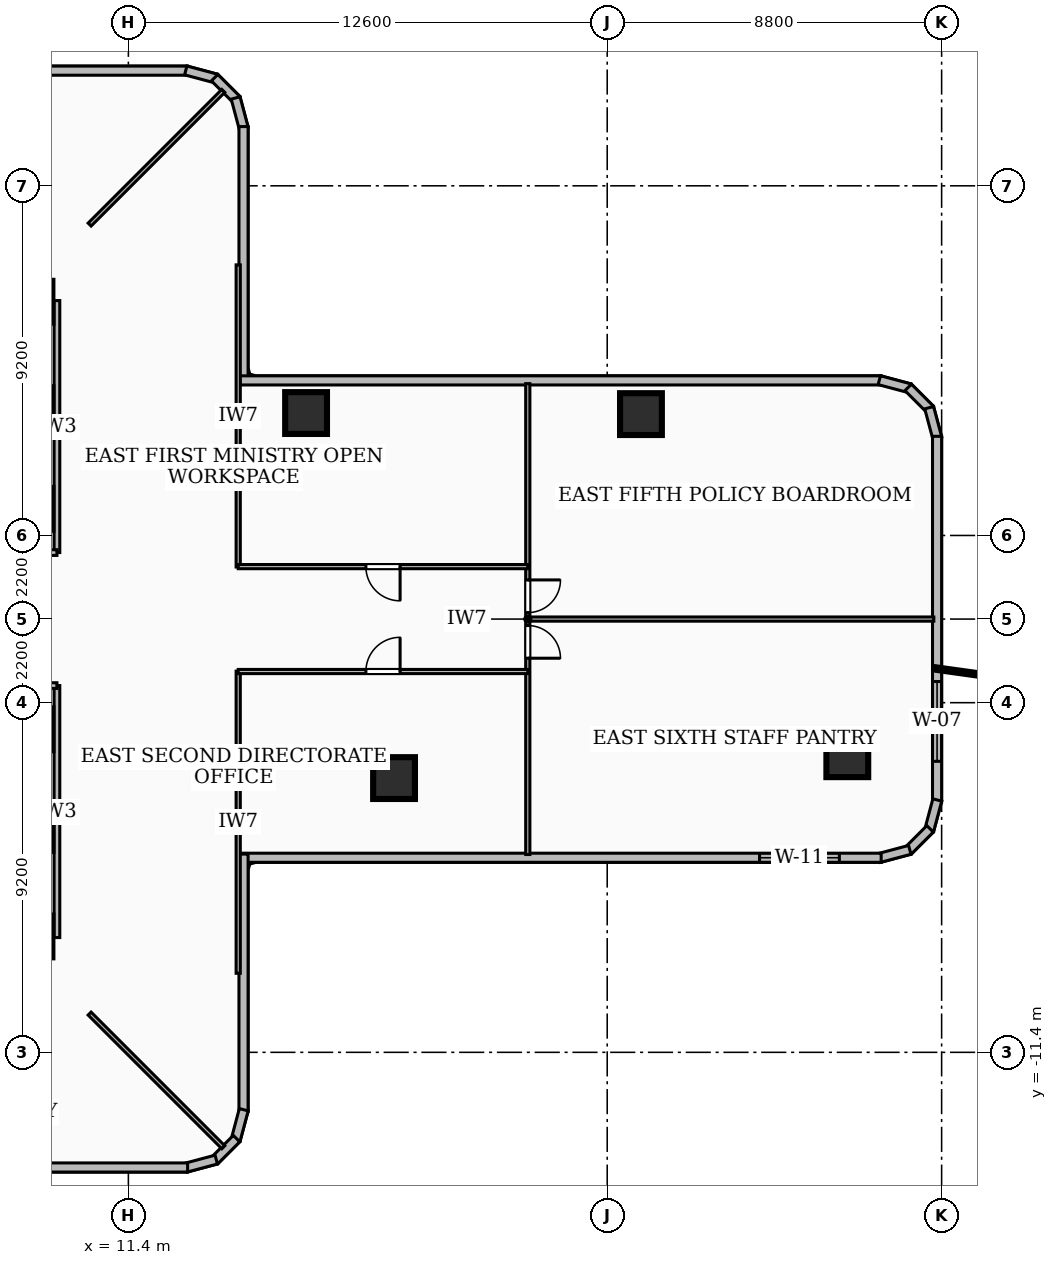
"""IFC4 building model, lengths in metres.
Left out: names, types, materials, properties, quantities, classifications, styles, units other than length and angle.
Written with IfcOpenShell. Run it as: python <this file> out.ifc"""

import sys

from ifc_helpers import new_model, si_unit, direction, frame, frame_2d, origin, origin_2d, place, context, subcontext, project, spatial, rectangle, extrude, element, fill, save


model = new_model("IFC4")
c1 = context("Model", 3, precision=1e-05, world=origin(), true_north=direction((0.0, 1.0)))
c2 = subcontext(c1, "Body", "Model", "MODEL_VIEW")
j1 = project(units=[si_unit("LENGTHUNIT", "METRE"), si_unit("PLANEANGLEUNIT", "RADIAN")], contexts=[c1])
p1 = place(None, origin())
s1 = spatial("IfcSite", under=j1, at=p1, CompositionType="ELEMENT")
p2 = place(p1, origin())
s2 = spatial("IfcBuilding", under=s1, at=p2, CompositionType="ELEMENT")
p3 = place(p2, frame((0.0, 0.0, 31.68)))
s3 = spatial("IfcBuildingStorey", under=s2, at=p3, CompositionType="ELEMENT", Elevation=31.68)
for number, where, z_axis, x_axis in (
    (1, (8.85, -5.55, 0.0), (0.0, 0.0, 1.0), (1.0, 0.0, 0.0)),
    (2, (8.85, -2.9, 0.0), (0.0, 0.0, 1.0), (1.0, 0.0, 0.0)),
    (3, (8.85, 2.9, 0.0), (0.0, 0.0, 1.0), (1.0, 0.0, 0.0)),
    (4, (8.85, 5.55, 0.0), (0.0, 0.0, 1.0), (1.0, 0.0, 0.0)),
    (5, (8.85, -8.35, 0.0), (0.0, 0.0, 1.0), (1.0, 0.0, 0.0)),
    (6, (8.85, 8.35, 0.0), (0.0, 0.0, 1.0), (1.0, 0.0, 0.0)),
    (7, (18.391, -4.184, 0.0), (0.0, 0.0, 1.0), (1.0, 0.0, 0.0)),
    (8, (16.076, 5.421, 0.0), (0.0, 0.0, 1.0), (1.0, 0.0, 0.0)),
    (9, (30.318, -3.609, 0.0), (0.0, 0.0, 1.0), (1.0, 0.0, 0.0)),
    (10, (24.888, 5.393, 0.0), (0.0, 0.0, 1.0), (1.0, 0.0, 0.0)),
):
    element("IfcColumn", number, at=place(p3, frame(where, z_axis=z_axis, x_axis=x_axis)), inside=s3, PredefinedType="COLUMN", context=c2, shape_type="SweptSolid", body=[
        extrude(rectangle(XDim=1.1, YDim=1.1, at=origin_2d()), origin(), (0.0, 0.0, 1.0), 3.6),
    ])
p4 = place(p3, frame((6.184, 14.43, 0.0), z_axis=(0.0, 0.0, 1.0), x_axis=(1.0, 0.0, 0.0)))
e11 = element("IfcWall", 11, at=p4, inside=s3, PredefinedType="SOLIDWALL", context=c2, shape_type="SweptSolid", body=[
    extrude(rectangle(XDim=6.775, YDim=0.24, at=frame_2d((3.387, 0.0))), origin(), (0.0, 0.0, 1.0), 2.644),
])
p5 = place(p3, frame((12.91, 14.436, 0.0), z_axis=(0.0, 0.0, 1.0), x_axis=(0.966161677396, -0.257937227116, 0.0)))
e12 = element("IfcWall", 12, at=p5, inside=s3, PredefinedType="SOLIDWALL", context=c2, shape_type="SweptSolid", body=[
    extrude(rectangle(XDim=0.83, YDim=0.24, at=frame_2d((0.415, 0.0))), origin(), (0.0, 0.0, 1.0), 3.34),
])
p6 = place(p3, frame((13.67, 14.246, 0.0), z_axis=(0.0, 0.0, 1.0), x_axis=(0.707106781187, -0.707106781187, 0.0)))
e13 = element("IfcWall", 13, at=p6, inside=s3, PredefinedType="SOLIDWALL", context=c2, shape_type="SweptSolid", body=[
    extrude(rectangle(XDim=0.815, YDim=0.24, at=frame_2d((0.407, 0.0))), origin(), (0.0, 0.0, 1.0), 3.34),
])
p7 = place(p3, frame((14.222, 13.712, 0.0), z_axis=(0.0, 0.0, 1.0), x_axis=(0.257937227116, -0.966161677396, 0.0)))
e14 = element("IfcWall", 14, at=p7, inside=s3, PredefinedType="SOLIDWALL", context=c2, shape_type="SweptSolid", body=[
    extrude(rectangle(XDim=0.83, YDim=0.24, at=frame_2d((0.415, 0.0))), origin(), (0.0, 0.0, 1.0), 3.34),
])
p8 = place(p3, frame((14.43, 12.959, 0.0), z_axis=(0.0, 0.0, 1.0), x_axis=(0.0, -1.0, 0.0)))
e15 = element("IfcWall", 15, at=p8, inside=s3, PredefinedType="SOLIDWALL", context=c2, shape_type="SweptSolid", body=[
    extrude(rectangle(XDim=6.775, YDim=0.24, at=frame_2d((3.387, 0.0))), origin(), (0.0, 0.0, 1.0), 2.644),
])
p9 = place(p3, frame((14.334, 6.28, 0.0), z_axis=(0.0, 0.0, 1.0), x_axis=(1.0, 0.0, 0.0)))
e16 = element("IfcWall", 16, at=p9, inside=s3, PredefinedType="SOLIDWALL", context=c2, shape_type="SweptSolid", body=[
    extrude(rectangle(XDim=16.875, YDim=0.24, at=frame_2d((8.438, 0.0))), origin(), (0.0, 0.0, 1.0), 2.644),
])
p10 = place(p3, frame((31.16, 6.286, 0.0), z_axis=(0.0, 0.0, 1.0), x_axis=(0.966234939601, -0.25766265056, 0.0)))
e17 = element("IfcWall", 17, at=p10, inside=s3, PredefinedType="SOLIDWALL", context=c2, shape_type="SweptSolid", body=[
    extrude(rectangle(XDim=0.83, YDim=0.24, at=frame_2d((0.415, 0.0))), origin(), (0.0, 0.0, 1.0), 3.34),
])
p11 = place(p3, frame((31.92, 6.096, 0.0), z_axis=(0.0, 0.0, 1.0), x_axis=(0.707256607812, -0.706956922808, 0.0)))
e18 = element("IfcWall", 18, at=p11, inside=s3, PredefinedType="SOLIDWALL", context=c2, shape_type="SweptSolid", body=[
    extrude(rectangle(XDim=0.815, YDim=0.24, at=frame_2d((0.407, 0.0))), origin(), (0.0, 0.0, 1.0), 3.34),
])
p12 = place(p3, frame((32.472, 5.562, 0.0), z_axis=(0.0, 0.0, 1.0), x_axis=(0.257937227116, -0.966161677396, 0.0)))
e19 = element("IfcWall", 19, at=p12, inside=s3, PredefinedType="SOLIDWALL", context=c2, shape_type="SweptSolid", body=[
    extrude(rectangle(XDim=0.83, YDim=0.24, at=frame_2d((0.415, 0.0))), origin(), (0.0, 0.0, 1.0), 3.34),
])
p13 = place(p3, frame((32.68, 4.809, 0.0), z_axis=(0.0, 0.0, 1.0), x_axis=(0.0, -1.0, 0.0)))
e20 = element("IfcWall", 20, at=p13, inside=s3, PredefinedType="SOLIDWALL", context=c2, shape_type="SweptSolid", body=[
    extrude(rectangle(XDim=9.618, YDim=0.24, at=frame_2d((4.809, 0.0))), origin(), (0.0, 0.0, 1.0), 3.34),
])
p14 = place(p13, frame((6.452, 0.0, 0.85)))
e21 = element("IfcOpeningElement", 21, at=p14, cuts=e20, PredefinedType="OPENING", context=c2, shape_type="SweptSolid", body=[
    extrude(rectangle(XDim=2.1, YDim=1.8, at=frame_2d((1.05, 0.9))), frame((0.0, 0.13, 0.0), z_axis=(0.0, -1.0, 0.0), x_axis=(1.0, 0.0, 0.0)), (0.0, 0.0, 1.0), 0.26),
])
p15 = place(p3, frame((32.686, -4.76, 0.0), z_axis=(0.0, 0.0, 1.0), x_axis=(-0.257937227116, -0.966161677396, 0.0)))
e22 = element("IfcWall", 22, at=p15, inside=s3, PredefinedType="SOLIDWALL", context=c2, shape_type="SweptSolid", body=[
    extrude(rectangle(XDim=0.83, YDim=0.24, at=frame_2d((0.415, 0.0))), origin(), (0.0, 0.0, 1.0), 3.34),
])
p16 = place(p3, frame((32.496, -5.52, 0.0), z_axis=(0.0, 0.0, 1.0), x_axis=(-0.707256607812, -0.706956922808, 0.0)))
e23 = element("IfcWall", 23, at=p16, inside=s3, PredefinedType="SOLIDWALL", context=c2, shape_type="SweptSolid", body=[
    extrude(rectangle(XDim=0.815, YDim=0.24, at=frame_2d((0.407, 0.0))), origin(), (0.0, 0.0, 1.0), 3.34),
])
p17 = place(p3, frame((31.962, -6.072, 0.0), z_axis=(0.0, 0.0, 1.0), x_axis=(-0.966234939601, -0.25766265056, 0.0)))
e24 = element("IfcWall", 24, at=p17, inside=s3, PredefinedType="SOLIDWALL", context=c2, shape_type="SweptSolid", body=[
    extrude(rectangle(XDim=0.83, YDim=0.24, at=frame_2d((0.415, 0.0))), origin(), (0.0, 0.0, 1.0), 3.34),
])
p18 = place(p3, frame((31.209, -6.28, 0.0), z_axis=(0.0, 0.0, 1.0), x_axis=(-1.0, 0.0, 0.0)))
e25 = element("IfcWall", 25, at=p18, inside=s3, PredefinedType="SOLIDWALL", context=c2, shape_type="SweptSolid", body=[
    extrude(rectangle(XDim=16.875, YDim=0.24, at=frame_2d((8.438, 0.0))), origin(), (0.0, 0.0, 1.0), 3.34),
])
p19 = place(p18, frame((1.1, 0.0, 0.85)))
e26 = element("IfcOpeningElement", 26, at=p19, cuts=e25, PredefinedType="OPENING", context=c2, shape_type="SweptSolid", body=[
    extrude(rectangle(XDim=2.1, YDim=1.6, at=frame_2d((1.05, 0.8))), frame((0.0, 0.13, 0.0), z_axis=(0.0, -1.0, 0.0), x_axis=(1.0, 0.0, 0.0)), (0.0, 0.0, 1.0), 0.26),
])
p20 = place(p3, frame((14.43, -6.184, 0.0), z_axis=(0.0, 0.0, 1.0), x_axis=(0.0, -1.0, 0.0)))
e27 = element("IfcWall", 27, at=p20, inside=s3, PredefinedType="SOLIDWALL", context=c2, shape_type="SweptSolid", body=[
    extrude(rectangle(XDim=6.775, YDim=0.24, at=frame_2d((3.387, 0.0))), origin(), (0.0, 0.0, 1.0), 3.34),
])
p21 = place(p3, frame((14.436, -12.91, 0.0), z_axis=(0.0, 0.0, 1.0), x_axis=(-0.257937227116, -0.966161677396, 0.0)))
e28 = element("IfcWall", 28, at=p21, inside=s3, PredefinedType="SOLIDWALL", context=c2, shape_type="SweptSolid", body=[
    extrude(rectangle(XDim=0.83, YDim=0.24, at=frame_2d((0.415, 0.0))), origin(), (0.0, 0.0, 1.0), 3.34),
])
p22 = place(p3, frame((14.246, -13.67, 0.0), z_axis=(0.0, 0.0, 1.0), x_axis=(-0.707106781187, -0.707106781187, 0.0)))
e29 = element("IfcWall", 29, at=p22, inside=s3, PredefinedType="SOLIDWALL", context=c2, shape_type="SweptSolid", body=[
    extrude(rectangle(XDim=0.815, YDim=0.24, at=frame_2d((0.407, 0.0))), origin(), (0.0, 0.0, 1.0), 3.34),
])
p23 = place(p3, frame((13.712, -14.222, 0.0), z_axis=(0.0, 0.0, 1.0), x_axis=(-0.966161677396, -0.257937227116, 0.0)))
e30 = element("IfcWall", 30, at=p23, inside=s3, PredefinedType="SOLIDWALL", context=c2, shape_type="SweptSolid", body=[
    extrude(rectangle(XDim=0.83, YDim=0.24, at=frame_2d((0.415, 0.0))), origin(), (0.0, 0.0, 1.0), 3.34),
])
p24 = place(p3, frame((12.959, -14.43, 0.0), z_axis=(0.0, 0.0, 1.0), x_axis=(-1.0, 0.0, 0.0)))
e31 = element("IfcWall", 31, at=p24, inside=s3, PredefinedType="SOLIDWALL", context=c2, shape_type="SweptSolid", body=[
    extrude(rectangle(XDim=6.775, YDim=0.24, at=frame_2d((3.387, 0.0))), origin(), (0.0, 0.0, 1.0), 2.421),
])
p25 = place(p3, frame((9.52, 1.75, 0.0), z_axis=(0.0, 0.0, 1.0), x_axis=(0.0, 1.0, 0.0)))
e32 = element("IfcWall", 32, at=p25, inside=s3, PredefinedType="PARTITIONING", context=c2, shape_type="SweptSolid", body=[
    extrude(rectangle(XDim=6.63, YDim=0.15, at=frame_2d((3.315, 0.0))), origin(), (0.0, 0.0, 1.0), 2.421),
])
p26 = place(p3, frame((7.85, 1.75, 0.0), z_axis=(0.0, 0.0, 1.0), x_axis=(1.0, 0.0, 0.0)))
e33 = element("IfcWall", 33, at=p26, inside=s3, PredefinedType="PARTITIONING", context=c2, shape_type="SweptSolid", body=[
    extrude(rectangle(XDim=1.67, YDim=0.15, at=frame_2d((0.835, 0.0))), origin(), (0.0, 0.0, 1.0), 2.405),
])
p27 = place(p3, frame((9.52, -8.38, 0.0), z_axis=(0.0, 0.0, 1.0), x_axis=(0.0, 1.0, 0.0)))
e34 = element("IfcWall", 34, at=p27, inside=s3, PredefinedType="PARTITIONING", context=c2, shape_type="SweptSolid", body=[
    extrude(rectangle(XDim=6.63, YDim=0.15, at=frame_2d((3.315, 0.0))), origin(), (0.0, 0.0, 1.0), 2.421),
])
p28 = place(p3, frame((7.85, -1.75, 0.0), z_axis=(0.0, 0.0, 1.0), x_axis=(1.0, 0.0, 0.0)))
e35 = element("IfcWall", 35, at=p28, inside=s3, PredefinedType="PARTITIONING", context=c2, shape_type="SweptSolid", body=[
    extrude(rectangle(XDim=1.67, YDim=0.15, at=frame_2d((0.835, 0.0))), origin(), (0.0, 0.0, 1.0), 2.405),
])
p29 = place(p3, frame((10.38, 10.38, 0.0), z_axis=(0.0, 0.0, 1.0), x_axis=(0.707106781187, 0.707106781187, 0.0)))
e36 = element("IfcWall", 36, at=p29, inside=s3, PredefinedType="PARTITIONING", context=c2, shape_type="SweptSolid", body=[
    extrude(rectangle(XDim=4.975, YDim=0.11, at=frame_2d((2.488, 0.0))), origin(), (0.0, 0.0, 1.0), 2.644),
])
p30 = place(p3, frame((10.38, -10.38, 0.0), z_axis=(0.0, 0.0, 1.0), x_axis=(0.707106781187, -0.707106781187, 0.0)))
e37 = element("IfcWall", 37, at=p30, inside=s3, PredefinedType="PARTITIONING", context=c2, shape_type="SweptSolid", body=[
    extrude(rectangle(XDim=4.975, YDim=0.11, at=frame_2d((2.488, 0.0))), origin(), (0.0, 0.0, 1.0), 3.34),
])
for number, where, z_axis, x_axis in (
    (38, (14.29, 1.37, 0.0), (0.0, 0.0, 1.0), (0.0, 1.0, 0.0)),
    (39, (14.29, -9.32, 0.0), (0.0, 0.0, 1.0), (0.0, 1.0, 0.0)),
):
    element("IfcWall", number, at=place(p3, frame(where, z_axis=z_axis, x_axis=x_axis)), inside=s3, PredefinedType="PARTITIONING", context=c2, shape_type="SweptSolid", body=[
        extrude(rectangle(XDim=7.95, YDim=0.11, at=frame_2d((3.975, 0.0))), origin(), (0.0, 0.0, 1.0), 2.421),
    ])
p31 = place(p3, frame((21.91, 1.38, 0.0), z_axis=(0.0, 0.0, 1.0), x_axis=(-1.0, 0.0, 0.0)))
e40 = element("IfcWall", 40, at=p31, inside=s3, PredefinedType="PARTITIONING", context=c2, shape_type="SweptSolid", body=[
    extrude(rectangle(XDim=7.62, YDim=0.11, at=frame_2d((3.81, 0.0))), origin(), (0.0, 0.0, 1.0), 2.869),
])
p32 = place(p31, frame((3.36, 0.0, 0.0)))
e41 = element("IfcOpeningElement", 41, at=p32, cuts=e40, PredefinedType="OPENING", context=c2, shape_type="SweptSolid", body=[
    extrude(rectangle(XDim=0.9, YDim=2.06, at=frame_2d((0.45, 1.03))), frame((0.0, 0.065, 0.0), z_axis=(0.0, -1.0, 0.0), x_axis=(1.0, 0.0, 0.0)), (0.0, 0.0, 1.0), 0.13),
])
p33 = place(p3, frame((14.29, -1.38, 0.0), z_axis=(0.0, 0.0, 1.0), x_axis=(1.0, 0.0, 0.0)))
e42 = element("IfcWall", 42, at=p33, inside=s3, PredefinedType="PARTITIONING", context=c2, shape_type="SweptSolid", body=[
    extrude(rectangle(XDim=7.62, YDim=0.11, at=frame_2d((3.81, 0.0))), origin(), (0.0, 0.0, 1.0), 2.869),
])
p34 = place(p33, frame((3.36, 0.0, 0.0)))
e43 = element("IfcOpeningElement", 43, at=p34, cuts=e42, PredefinedType="OPENING", context=c2, shape_type="SweptSolid", body=[
    extrude(rectangle(XDim=0.9, YDim=2.06, at=frame_2d((0.45, 1.03))), frame((0.0, 0.065, 0.0), z_axis=(0.0, -1.0, 0.0), x_axis=(1.0, 0.0, 0.0)), (0.0, 0.0, 1.0), 0.13),
])
p35 = place(p3, frame((21.97, 0.0, 0.0), z_axis=(0.0, 0.0, 1.0), x_axis=(1.0, 0.0, 0.0)))
e44 = element("IfcWall", 44, at=p35, inside=s3, PredefinedType="PARTITIONING", context=c2, shape_type="SweptSolid", body=[
    extrude(rectangle(XDim=10.625, YDim=0.11, at=frame_2d((5.312, 0.0))), origin(), (0.0, 0.0, 1.0), 2.72),
])
p36 = place(p3, frame((21.91, 6.195, 0.0), z_axis=(0.0, 0.0, 1.0), x_axis=(0.0, -1.0, 0.0)))
e45 = element("IfcWall", 45, at=p36, inside=s3, PredefinedType="PARTITIONING", context=c2, shape_type="SweptSolid", body=[
    extrude(rectangle(XDim=12.39, YDim=0.11, at=frame_2d((6.195, 0.0))), origin(), (0.0, 0.0, 1.0), 2.421),
])
p37 = place(p36, frame((6.365, 0.0, 0.0)))
e46 = element("IfcOpeningElement", 46, at=p37, cuts=e45, PredefinedType="OPENING", context=c2, shape_type="SweptSolid", body=[
    extrude(rectangle(XDim=0.86, YDim=2.04, at=frame_2d((0.43, 1.02))), frame((0.0, 0.065, 0.0), z_axis=(0.0, -1.0, 0.0), x_axis=(1.0, 0.0, 0.0)), (0.0, 0.0, 1.0), 0.13),
])
p38 = place(p36, frame((5.165, 0.0, 0.0)))
e47 = element("IfcOpeningElement", 47, at=p38, cuts=e45, PredefinedType="OPENING", context=c2, shape_type="SweptSolid", body=[
    extrude(rectangle(XDim=0.86, YDim=2.04, at=frame_2d((0.43, 1.02))), frame((0.0, 0.065, 0.0), z_axis=(0.0, -1.0, 0.0), x_axis=(1.0, 0.0, 0.0)), (0.0, 0.0, 1.0), 0.13),
])
p39 = place(p14, origin())
e48 = element("IfcWindow", 48, at=p39, inside=s3, PartitioningType="SINGLE_PANEL", PredefinedType="WINDOW", context=c2, shape_type="SweptSolid", body=[
    extrude(rectangle(XDim=2.1, YDim=1.8, at=frame_2d((1.05, 0.9))), frame((0.0, 0.03, 0.0), z_axis=(0.0, -1.0, 0.0), x_axis=(1.0, 0.0, 0.0)), (0.0, 0.0, 1.0), 0.06),
])
fill(e21, e48)
p40 = place(p19, origin())
e49 = element("IfcWindow", 49, at=p40, inside=s3, PartitioningType="SINGLE_PANEL", PredefinedType="WINDOW", context=c2, shape_type="SweptSolid", body=[
    extrude(rectangle(XDim=2.1, YDim=1.6, at=frame_2d((1.05, 0.8))), frame((0.0, 0.03, 0.0), z_axis=(0.0, -1.0, 0.0), x_axis=(1.0, 0.0, 0.0)), (0.0, 0.0, 1.0), 0.06),
])
fill(e26, e49)
p41 = place(p32, origin())
e50 = element("IfcDoor", 50, at=p41, inside=s3, OperationType="SINGLE_SWING_LEFT", PredefinedType="DOOR", context=c2, shape_type="SweptSolid", body=[
    extrude(rectangle(XDim=0.9, YDim=2.06, at=frame_2d((0.45, 1.03))), frame((0.0, 0.025, 0.0), z_axis=(0.0, -1.0, 0.0), x_axis=(1.0, 0.0, 0.0)), (0.0, 0.0, 1.0), 0.05),
])
fill(e41, e50)
p42 = place(p34, origin())
e51 = element("IfcDoor", 51, at=p42, inside=s3, OperationType="SINGLE_SWING_RIGHT", PredefinedType="DOOR", context=c2, shape_type="SweptSolid", body=[
    extrude(rectangle(XDim=0.9, YDim=2.06, at=frame_2d((0.45, 1.03))), frame((0.0, 0.025, 0.0), z_axis=(0.0, -1.0, 0.0), x_axis=(1.0, 0.0, 0.0)), (0.0, 0.0, 1.0), 0.05),
])
fill(e43, e51)
p43 = place(p37, origin())
e52 = element("IfcDoor", 52, at=p43, inside=s3, OperationType="SINGLE_SWING_RIGHT", PredefinedType="DOOR", context=c2, shape_type="SweptSolid", body=[
    extrude(rectangle(XDim=0.86, YDim=2.04, at=frame_2d((0.43, 1.02))), frame((0.0, 0.025, 0.0), z_axis=(0.0, -1.0, 0.0), x_axis=(1.0, 0.0, 0.0)), (0.0, 0.0, 1.0), 0.05),
])
fill(e46, e52)
p44 = place(p38, origin())
e53 = element("IfcDoor", 53, at=p44, inside=s3, OperationType="SINGLE_SWING_LEFT", PredefinedType="DOOR", context=c2, shape_type="SweptSolid", body=[
    extrude(rectangle(XDim=0.86, YDim=2.04, at=frame_2d((0.43, 1.02))), frame((0.0, 0.025, 0.0), z_axis=(0.0, -1.0, 0.0), x_axis=(1.0, 0.0, 0.0)), (0.0, 0.0, 1.0), 0.05),
])
fill(e47, e53)
save(model, sys.argv[1])
